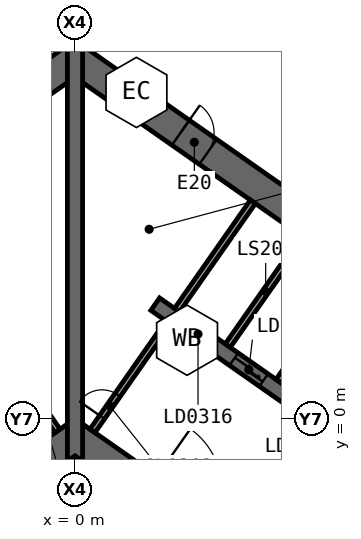
"""IFC4 building model, lengths in metres.
Left out: names, types, materials, properties, quantities, classifications, styles, units other than length and angle.
Written with IfcOpenShell. Run it as: python <this file> out.ifc"""

import sys

from ifc_helpers import new_model, si_unit, direction, frame, frame_2d, origin, place, context, subcontext, project, spatial, polyline, rectangle, outline, extrude, element, fill, save


model = new_model("IFC4")
c1 = context("Model", 3, precision=1e-05, world=origin(), true_north=direction((0.0, 1.0)))
c2 = subcontext(c1, "Body", "Model", "MODEL_VIEW")
j1 = project(units=[si_unit("LENGTHUNIT", "METRE"), si_unit("PLANEANGLEUNIT", "RADIAN")], contexts=[c1])
p1 = place(None, origin())
s1 = spatial("IfcSite", under=j1, at=p1, CompositionType="ELEMENT")
p2 = place(p1, origin())
s2 = spatial("IfcBuilding", under=s1, at=p2, CompositionType="ELEMENT")
p3 = place(p2, origin())
s3 = spatial("IfcBuildingStorey", under=s2, at=p3, CompositionType="ELEMENT", Elevation=0.0)
p4 = place(p3, frame((0.037, 11.867, 0.0), z_axis=(0.0, 0.0, 1.0), x_axis=(-0.819155306259, -0.573571777746, 0.0)))
e1 = element("IfcWall", 1, at=p4, inside=s3, PredefinedType="SHEAR", context=c2, shape_type="SweptSolid", body=[
    extrude(outline(polyline([(33.837, 0.5), (0.7, 0.5), (0.0, -0.5), (33.837, -0.5), (33.837, 0.5)])), origin(), (0.0, 0.0, 1.0), 9.0),
])
p5 = place(p3, frame((0.037, -0.585, 0.0), z_axis=(0.0, 0.0, 1.0), x_axis=(-0.819157152511, -0.573569140985, 0.0)))
e2 = element("IfcWall", 2, at=p5, inside=s3, PredefinedType="SHEAR", context=c2, shape_type="SweptSolid", body=[
    extrude(outline(polyline([(26.695, 0.5), (0.7, 0.5), (0.0, -0.5), (26.695, -0.5), (26.695, 0.5)])), origin(), (0.0, 0.0, 1.0), 9.0),
])
p6 = place(p5, frame((2.995, 0.0, 0.0)))
e3 = element("IfcOpeningElement", 3, at=p6, cuts=e2, PredefinedType="OPENING", context=c2, shape_type="SweptSolid", body=[
    extrude(rectangle(XDim=2.4, YDim=2.1, at=frame_2d((1.2, 1.05))), frame((0.0, 0.51, 0.0), z_axis=(0.0, -1.0, 0.0), x_axis=(1.0, 0.0, 0.0)), (0.0, 0.0, 1.0), 1.02),
])
p7 = place(p5, frame((11.995, 0.0, 0.0)))
e4 = element("IfcOpeningElement", 4, at=p7, cuts=e2, PredefinedType="OPENING", context=c2, shape_type="SweptSolid", body=[
    extrude(rectangle(XDim=2.4, YDim=2.1, at=frame_2d((1.2, 1.05))), frame((0.0, 0.51, 0.0), z_axis=(0.0, -1.0, 0.0), x_axis=(1.0, 0.0, 0.0)), (0.0, 0.0, 1.0), 1.02),
])
p8 = place(p3, frame((-0.037, 11.867, 0.0), z_axis=(0.0, 0.0, 1.0), x_axis=(0.819155306259, -0.573571777746, 0.0)))
e5 = element("IfcWall", 5, at=p8, inside=s3, PredefinedType="SHEAR", context=c2, shape_type="SweptSolid", body=[
    extrude(outline(polyline([(33.837, 0.5), (0.0, 0.5), (0.7, -0.5), (33.837, -0.5), (33.837, 0.5)])), origin(), (0.0, 0.0, 1.0), 9.0),
])
p9 = place(p8, frame((4.287, 0.0, 0.0)))
e6 = element("IfcOpeningElement", 6, at=p9, cuts=e5, PredefinedType="OPENING", context=c2, shape_type="SweptSolid", body=[
    extrude(rectangle(XDim=1.1, YDim=2.1, at=frame_2d((0.55, 1.05))), frame((0.0, 0.51, 0.0), z_axis=(0.0, -1.0, 0.0), x_axis=(1.0, 0.0, 0.0)), (0.0, 0.0, 1.0), 1.02),
])
p10 = place(p3, frame((-0.037, -0.585, 0.0), z_axis=(0.0, 0.0, 1.0), x_axis=(0.819157152511, -0.573569140985, 0.0)))
e7 = element("IfcWall", 7, at=p10, inside=s3, PredefinedType="SHEAR", context=c2, shape_type="SweptSolid", body=[
    extrude(outline(polyline([(26.695, 0.5), (0.0, 0.5), (0.7, -0.5), (26.695, -0.5), (26.695, 0.5)])), origin(), (0.0, 0.0, 1.0), 9.0),
])
p11 = place(p10, frame((2.995, 0.0, 0.0)))
e8 = element("IfcOpeningElement", 8, at=p11, cuts=e7, PredefinedType="OPENING", context=c2, shape_type="SweptSolid", body=[
    extrude(rectangle(XDim=2.4, YDim=2.1, at=frame_2d((1.2, 1.05))), frame((0.0, 0.51, 0.0), z_axis=(0.0, -1.0, 0.0), x_axis=(1.0, 0.0, 0.0)), (0.0, 0.0, 1.0), 1.02),
])
p12 = place(p10, frame((12.445, 0.0, 0.0)))
e9 = element("IfcOpeningElement", 9, at=p12, cuts=e7, PredefinedType="OPENING", context=c2, shape_type="SweptSolid", body=[
    extrude(rectangle(XDim=1.5, YDim=2.1, at=frame_2d((0.75, 1.05))), frame((0.0, 0.51, 0.0), z_axis=(0.0, -1.0, 0.0), x_axis=(1.0, 0.0, 0.0)), (0.0, 0.0, 1.0), 1.02),
])
p13 = place(p3, frame((2.638, 3.768, 0.0), z_axis=(0.0, 0.0, 1.0), x_axis=(0.819148977158, -0.573580816643, 0.0)))
e10 = element("IfcWall", 10, at=p13, inside=s3, PredefinedType="SHEAR", context=c2, shape_type="SweptSolid", body=[
    extrude(outline(polyline([(0.0, 0.25), (0.0, -0.25), (26.0, -0.25), (26.0, 0.25), (0.0, 0.25)])), origin(), (0.0, 0.0, 1.0), 9.0),
])
p14 = place(p13, frame((1.119, 0.0, 0.0)))
e11 = element("IfcOpeningElement", 11, at=p14, cuts=e10, PredefinedType="OPENING", context=c2, shape_type="SweptSolid", body=[
    extrude(rectangle(XDim=1.2, YDim=2.1, at=frame_2d((0.6, 1.05))), frame((0.0, 0.26, 0.0), z_axis=(0.0, -1.0, 0.0), x_axis=(1.0, 0.0, 0.0)), (0.0, 0.0, 1.0), 0.52),
])
p15 = place(p13, frame((3.156, 0.0, 0.0)))
e12 = element("IfcOpeningElement", 12, at=p15, cuts=e10, PredefinedType="OPENING", context=c2, shape_type="SweptSolid", body=[
    extrude(rectangle(XDim=1.2, YDim=2.1, at=frame_2d((0.6, 1.05))), frame((0.0, 0.26, 0.0), z_axis=(0.0, -1.0, 0.0), x_axis=(1.0, 0.0, 0.0)), (0.0, 0.0, 1.0), 0.52),
])
p16 = place(p13, frame((5.194, 0.0, 0.0)))
e13 = element("IfcOpeningElement", 13, at=p16, cuts=e10, PredefinedType="OPENING", context=c2, shape_type="SweptSolid", body=[
    extrude(rectangle(XDim=1.2, YDim=2.1, at=frame_2d((0.6, 1.05))), frame((0.0, 0.26, 0.0), z_axis=(0.0, -1.0, 0.0), x_axis=(1.0, 0.0, 0.0)), (0.0, 0.0, 1.0), 0.52),
])
p17 = place(p13, frame((7.231, 0.0, 0.0)))
e14 = element("IfcOpeningElement", 14, at=p17, cuts=e10, PredefinedType="OPENING", context=c2, shape_type="SweptSolid", body=[
    extrude(rectangle(XDim=1.2, YDim=2.1, at=frame_2d((0.6, 1.05))), frame((0.0, 0.26, 0.0), z_axis=(0.0, -1.0, 0.0), x_axis=(1.0, 0.0, 0.0)), (0.0, 0.0, 1.0), 0.52),
])
p18 = place(p13, frame((9.637, 0.0, 0.0)))
e15 = element("IfcOpeningElement", 15, at=p18, cuts=e10, PredefinedType="OPENING", context=c2, shape_type="SweptSolid", body=[
    extrude(rectangle(XDim=1.2, YDim=2.1, at=frame_2d((0.6, 1.05))), frame((0.0, 0.26, 0.0), z_axis=(0.0, -1.0, 0.0), x_axis=(1.0, 0.0, 0.0)), (0.0, 0.0, 1.0), 0.52),
])
p19 = place(p13, frame((11.812, 0.0, 0.0)))
e16 = element("IfcOpeningElement", 16, at=p19, cuts=e10, PredefinedType="OPENING", context=c2, shape_type="SweptSolid", body=[
    extrude(rectangle(XDim=1.2, YDim=2.1, at=frame_2d((0.6, 1.05))), frame((0.0, 0.26, 0.0), z_axis=(0.0, -1.0, 0.0), x_axis=(1.0, 0.0, 0.0)), (0.0, 0.0, 1.0), 0.52),
])
p20 = place(p13, frame((13.988, 0.0, 0.0)))
e17 = element("IfcOpeningElement", 17, at=p20, cuts=e10, PredefinedType="OPENING", context=c2, shape_type="SweptSolid", body=[
    extrude(rectangle(XDim=1.2, YDim=2.1, at=frame_2d((0.6, 1.05))), frame((0.0, 0.26, 0.0), z_axis=(0.0, -1.0, 0.0), x_axis=(1.0, 0.0, 0.0)), (0.0, 0.0, 1.0), 0.52),
])
p21 = place(p13, frame((16.262, 0.0, 0.0)))
e18 = element("IfcOpeningElement", 18, at=p21, cuts=e10, PredefinedType="OPENING", context=c2, shape_type="SweptSolid", body=[
    extrude(rectangle(XDim=1.0, YDim=2.1, at=frame_2d((0.5, 1.05))), frame((0.0, 0.26, 0.0), z_axis=(0.0, -1.0, 0.0), x_axis=(1.0, 0.0, 0.0)), (0.0, 0.0, 1.0), 0.52),
])
p22 = place(p3, frame((0.0, -1.396, 0.0), z_axis=(0.0, 0.0, 1.0), x_axis=(0.0, 1.0, 0.0)))
e19 = element("IfcWall", 19, at=p22, inside=s3, PredefinedType="SHEAR", context=c2, shape_type="SweptSolid", body=[
    extrude(outline(polyline([(0.0, -0.25), (0.175, -0.25), (1.221, -0.25), (12.452, -0.25), (13.848, -0.25), (13.857, -0.25), (13.968, -0.172), (13.848, 0.0), (13.968, 0.172), (13.857, 0.25), (13.848, 0.25), (12.452, 0.25), (1.221, 0.25), (0.175, 0.25), (0.0, 0.25), (0.175, 0.0), (0.0, -0.25)])), origin(), (0.0, 0.0, 1.0), 9.0),
])
p23 = place(p3, frame((5.024, 2.403, 0.0), z_axis=(0.0, 0.0, 1.0), x_axis=(0.573530143085, 0.819184457233, 0.0)))
e20 = element("IfcWall", 20, at=p23, inside=s3, PredefinedType="SOLIDWALL", context=c2, shape_type="SweptSolid", body=[
    extrude(rectangle(XDim=4.35, YDim=0.2, at=frame_2d((2.175, 0.0))), origin(), (0.0, 0.0, 1.0), 9.0),
])
p24 = place(p3, frame((6.693, 1.234, 0.0), z_axis=(0.0, 0.0, 1.0), x_axis=(0.573594173421, 0.819139624372, 0.0)))
e21 = element("IfcWall", 21, at=p24, inside=s3, PredefinedType="SOLIDWALL", context=c2, shape_type="SweptSolid", body=[
    extrude(rectangle(XDim=4.35, YDim=0.2, at=frame_2d((2.175, 0.0))), origin(), (0.0, 0.0, 1.0), 9.0),
])
p25 = place(p3, frame((-0.573, -0.402, 0.0), z_axis=(0.0, 0.0, 1.0), x_axis=(-0.57356780395, 0.819158088694, 0.0)))
e22 = element("IfcWall", 22, at=p25, inside=s3, PredefinedType="SOLIDWALL", context=c2, shape_type="SweptSolid", body=[
    extrude(rectangle(XDim=4.35, YDim=0.2, at=frame_2d((2.175, 0.0))), origin(), (0.0, 0.0, 1.0), 8.6),
])
p26 = place(p25, frame((0.55, 0.0, 0.0)))
e23 = element("IfcOpeningElement", 23, at=p26, cuts=e22, PredefinedType="OPENING", context=c2, shape_type="SweptSolid", body=[
    extrude(rectangle(XDim=0.9, YDim=2.1, at=frame_2d((0.45, 1.05))), frame((0.0, 0.11, 0.0), z_axis=(0.0, -1.0, 0.0), x_axis=(1.0, 0.0, 0.0)), (0.0, 0.0, 1.0), 0.22),
])
p27 = place(p3, frame((0.573, -0.402, 0.0), z_axis=(0.0, 0.0, 1.0), x_axis=(0.57356780395, 0.819158088694, 0.0)))
e24 = element("IfcWall", 24, at=p27, inside=s3, PredefinedType="SOLIDWALL", context=c2, shape_type="SweptSolid", body=[
    extrude(rectangle(XDim=4.35, YDim=0.2, at=frame_2d((2.175, 0.0))), origin(), (0.0, 0.0, 1.0), 8.6),
])
p28 = place(p27, frame((0.55, 0.0, 0.0)))
e25 = element("IfcOpeningElement", 25, at=p28, cuts=e24, PredefinedType="OPENING", context=c2, shape_type="SweptSolid", body=[
    extrude(rectangle(XDim=0.9, YDim=2.1, at=frame_2d((0.45, 1.05))), frame((0.0, 0.11, 0.0), z_axis=(0.0, -1.0, 0.0), x_axis=(1.0, 0.0, 0.0)), (0.0, 0.0, 1.0), 0.22),
])
p29 = place(p3, frame((3.355, 3.571, 0.0), z_axis=(0.0, 0.0, 1.0), x_axis=(0.57356780395, 0.819158088694, 0.0)))
e26 = element("IfcWall", 26, at=p29, inside=s3, PredefinedType="SOLIDWALL", context=c2, shape_type="SweptSolid", body=[
    extrude(rectangle(XDim=4.35, YDim=0.2, at=frame_2d((2.175, 0.0))), origin(), (0.0, 0.0, 1.0), 8.6),
])
p30 = place(p14, origin())
e27 = element("IfcDoor", 27, at=p30, inside=s3, OperationType="SLIDING_TO_LEFT", PredefinedType="DOOR", context=c2, shape_type="SweptSolid", body=[
    extrude(rectangle(XDim=1.2, YDim=2.1, at=frame_2d((0.6, 1.05))), frame((0.0, 0.025, 0.0), z_axis=(0.0, -1.0, 0.0), x_axis=(1.0, 0.0, 0.0)), (0.0, 0.0, 1.0), 0.05),
])
fill(e11, e27)
p31 = place(p15, origin())
e28 = element("IfcDoor", 28, at=p31, inside=s3, OperationType="SLIDING_TO_RIGHT", PredefinedType="DOOR", context=c2, shape_type="SweptSolid", body=[
    extrude(rectangle(XDim=1.2, YDim=2.1, at=frame_2d((0.6, 1.05))), frame((0.0, 0.025, 0.0), z_axis=(0.0, -1.0, 0.0), x_axis=(1.0, 0.0, 0.0)), (0.0, 0.0, 1.0), 0.05),
])
fill(e12, e28)
p32 = place(p28, origin())
e29 = element("IfcDoor", 29, at=p32, inside=s3, OperationType="SINGLE_SWING_RIGHT", PredefinedType="DOOR", context=c2, shape_type="SweptSolid", body=[
    extrude(rectangle(XDim=0.9, YDim=2.1, at=frame_2d((0.45, 1.05))), frame((0.0, 0.025, 0.0), z_axis=(0.0, -1.0, 0.0), x_axis=(1.0, 0.0, 0.0)), (0.0, 0.0, 1.0), 0.05),
])
fill(e25, e29)
p33 = place(p9, origin())
e30 = element("IfcDoor", 30, at=p33, inside=s3, OperationType="SINGLE_SWING_RIGHT", PredefinedType="DOOR", context=c2, shape_type="SweptSolid", body=[
    extrude(rectangle(XDim=1.1, YDim=2.1, at=frame_2d((0.55, 1.05))), frame((0.0, 0.025, 0.0), z_axis=(0.0, -1.0, 0.0), x_axis=(1.0, 0.0, 0.0)), (0.0, 0.0, 1.0), 0.05),
])
fill(e6, e30)
save(model, sys.argv[1])
